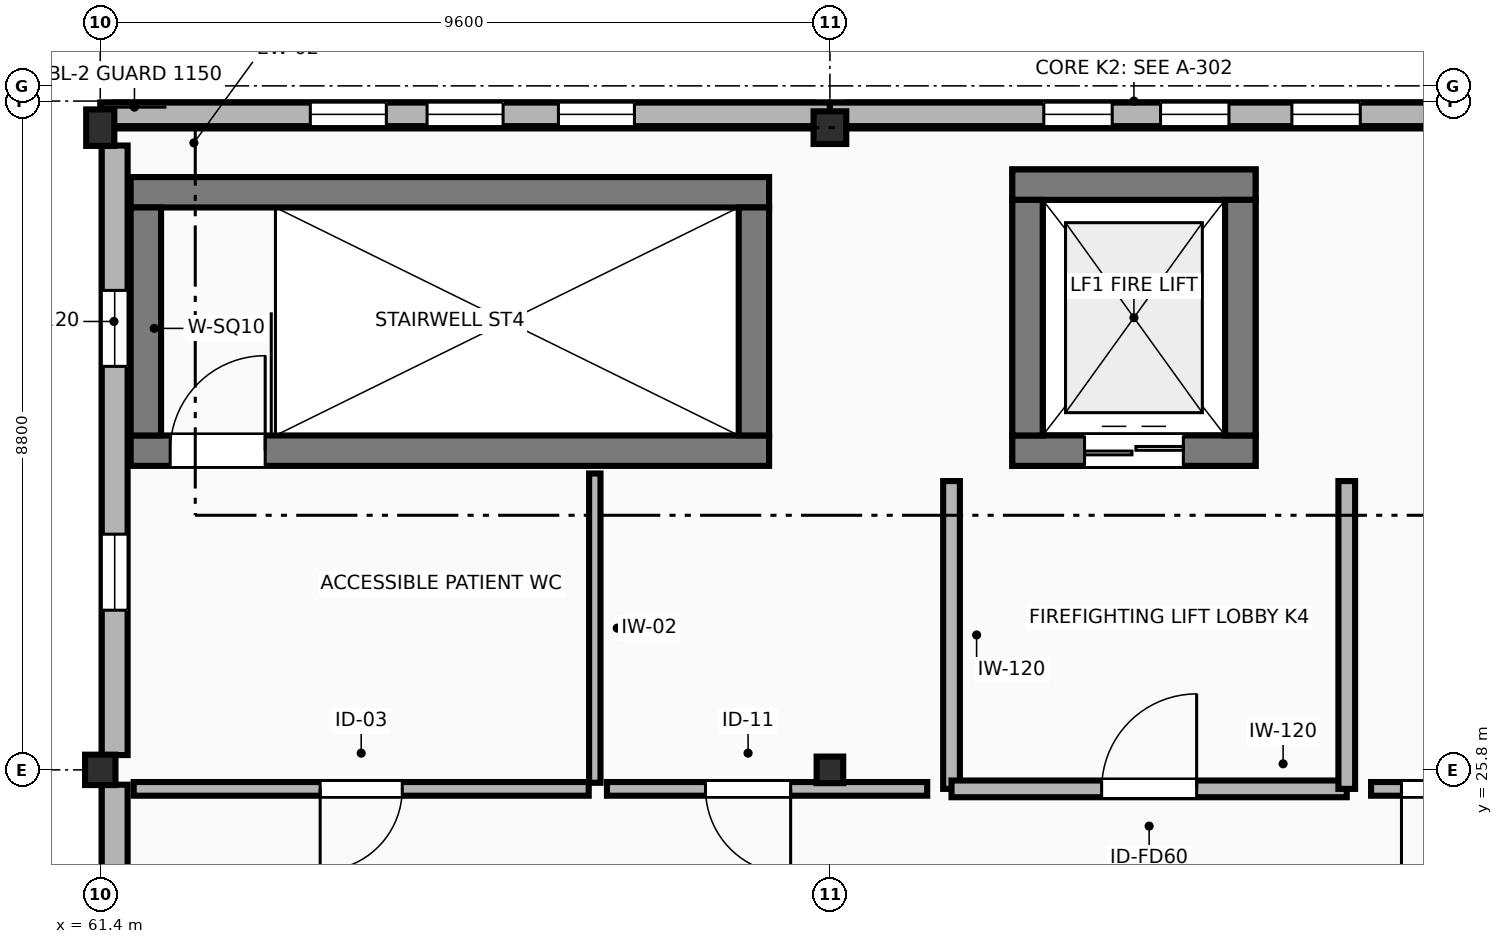
"""IFC4 building model, lengths in metres.
Left out: names, types, materials, properties, quantities, classifications, styles, units other than length and angle.
Written with IfcOpenShell. Run it as: python <this file> out.ifc"""

import sys

from ifc_helpers import new_model, si_unit, direction, frame, frame_2d, origin, origin_2d, place, context, subcontext, project, spatial, polyline, rectangle, outline, extrude, element, fill, save


model = new_model("IFC4")
c1 = context("Model", 3, precision=1e-05, world=origin(), true_north=direction((0.0, 1.0)))
c2 = subcontext(c1, "Body", "Model", "MODEL_VIEW")
j1 = project(units=[si_unit("LENGTHUNIT", "METRE"), si_unit("PLANEANGLEUNIT", "RADIAN")], contexts=[c1])
p1 = place(None, origin())
s1 = spatial("IfcSite", under=j1, at=p1, CompositionType="ELEMENT")
p2 = place(p1, origin())
s2 = spatial("IfcBuilding", under=s1, at=p2, CompositionType="ELEMENT")
p3 = place(p2, frame((0.0, 0.0, 22.2)))
s3 = spatial("IfcBuildingStorey", under=s2, at=p3, CompositionType="ELEMENT", Elevation=22.2)
p4 = place(p3, frame((61.4, 25.8, 0.0), z_axis=(0.0, 0.0, 1.0), x_axis=(1.0, 0.0, 0.0)))
e1 = element("IfcColumn", 1, at=p4, inside=s3, PredefinedType="COLUMN", context=c2, shape_type="SweptSolid", body=[
    extrude(rectangle(XDim=0.4, YDim=0.4, at=origin_2d()), origin(), (0.0, 0.0, 1.0), 4.2),
])
p5 = place(p3, frame((61.4, 34.25, 0.0), z_axis=(0.0, 0.0, 1.0), x_axis=(1.0, 0.0, 0.0)))
e2 = element("IfcColumn", 2, at=p5, inside=s3, PredefinedType="COLUMN", context=c2, shape_type="SweptSolid", body=[
    extrude(rectangle(XDim=0.37, YDim=0.48, at=origin_2d()), origin(), (0.0, 0.0, 1.0), 4.2),
])
p6 = place(p3, frame((71.0, 25.8, 0.0), z_axis=(0.0, 0.0, 1.0), x_axis=(1.0, 0.0, 0.0)))
e3 = element("IfcColumn", 3, at=p6, inside=s3, PredefinedType="COLUMN", context=c2, shape_type="SweptSolid", body=[
    extrude(rectangle(XDim=0.35, YDim=0.35, at=origin_2d()), origin(), (0.0, 0.0, 1.0), 4.2),
])
p7 = place(p3, frame((71.0, 34.25, 0.0), z_axis=(0.0, 0.0, 1.0), x_axis=(1.0, 0.0, 0.0)))
e4 = element("IfcColumn", 4, at=p7, inside=s3, PredefinedType="COLUMN", context=c2, shape_type="SweptSolid", body=[
    extrude(rectangle(XDim=0.43, YDim=0.43, at=origin_2d()), origin(), (0.0, 0.0, 1.0), 4.2),
])
p8 = place(p3, frame((80.415, 34.41, 0.0), z_axis=(0.0, 0.0, 1.0), x_axis=(-1.0, 0.0, 0.0)))
e5 = element("IfcWall", 5, at=p8, inside=s3, PredefinedType="STANDARD", context=c2, shape_type="SweptSolid", body=[
    extrude(rectangle(XDim=9.205, YDim=0.34, at=frame_2d((4.603, 0.0))), origin(), (0.0, 0.0, 1.0), 3.92),
])
p9 = place(p3, frame((70.79, 34.41, 0.0), z_axis=(0.0, 0.0, 1.0), x_axis=(-1.0, 0.0, 0.0)))
e6 = element("IfcWall", 6, at=p9, inside=s3, PredefinedType="STANDARD", context=c2, shape_type="SweptSolid", body=[
    extrude(rectangle(XDim=9.21, YDim=0.34, at=frame_2d((4.605, 0.0))), origin(), (0.0, 0.0, 1.0), 3.92),
])
p10 = place(p3, frame((61.59, 34.015, 0.0), z_axis=(0.0, 0.0, 1.0), x_axis=(0.0, -1.0, 0.0)))
e7 = element("IfcWall", 7, at=p10, inside=s3, PredefinedType="STANDARD", context=c2, shape_type="SweptSolid", body=[
    extrude(rectangle(XDim=8.02, YDim=0.34, at=frame_2d((4.01, 0.0))), origin(), (0.0, 0.0, 1.0), 3.035),
])
p11 = place(p10, frame((1.906, 0.0, 0.95)))
e8 = element("IfcOpeningElement", 8, at=p11, cuts=e7, PredefinedType="OPENING", context=c2, shape_type="SweptSolid", body=[
    extrude(rectangle(XDim=1.0, YDim=1.0, at=frame_2d((0.5, 0.5))), frame((0.0, 0.18, 0.0), z_axis=(0.0, -1.0, 0.0), x_axis=(1.0, 0.0, 0.0)), (0.0, 0.0, 1.0), 0.36),
])
p12 = place(p10, frame((5.114, 0.0, 0.95)))
e9 = element("IfcOpeningElement", 9, at=p12, cuts=e7, PredefinedType="OPENING", context=c2, shape_type="SweptSolid", body=[
    extrude(rectangle(XDim=1.0, YDim=1.0, at=frame_2d((0.5, 0.5))), frame((0.0, 0.18, 0.0), z_axis=(0.0, -1.0, 0.0), x_axis=(1.0, 0.0, 0.0)), (0.0, 0.0, 1.0), 0.36),
])
p13 = place(p3, frame((61.59, 25.605, 0.0), z_axis=(0.0, 0.0, 1.0), x_axis=(0.0, -1.0, 0.0)))
e10 = element("IfcWall", 10, at=p13, inside=s3, PredefinedType="STANDARD", context=c2, shape_type="SweptSolid", body=[
    extrude(rectangle(XDim=8.22, YDim=0.34, at=frame_2d((4.11, 0.0))), origin(), (0.0, 0.0, 1.0), 3.035),
])
p14 = place(p13, frame((1.866, 0.0, 0.95)))
e11 = element("IfcOpeningElement", 11, at=p14, cuts=e10, PredefinedType="OPENING", context=c2, shape_type="SweptSolid", body=[
    extrude(rectangle(XDim=1.2, YDim=1.2, at=frame_2d((0.6, 0.6))), frame((0.0, 0.18, 0.0), z_axis=(0.0, -1.0, 0.0), x_axis=(1.0, 0.0, 0.0)), (0.0, 0.0, 1.0), 0.36),
])
p15 = place(p13, frame((5.154, 0.0, 0.95)))
e12 = element("IfcOpeningElement", 12, at=p15, cuts=e10, PredefinedType="OPENING", context=c2, shape_type="SweptSolid", body=[
    extrude(rectangle(XDim=1.2, YDim=1.2, at=frame_2d((0.6, 0.6))), frame((0.0, 0.18, 0.0), z_axis=(0.0, -1.0, 0.0), x_axis=(1.0, 0.0, 0.0)), (0.0, 0.0, 1.0), 0.36),
])
p16 = place(p3, frame((71.0, 34.425, 4.2), z_axis=(0.0, 0.0, 1.0), x_axis=(-1.0, 0.0, 0.0)))
e13 = element("IfcWall", 13, at=p16, inside=s3, PredefinedType="STANDARD", context=c2, shape_type="SweptSolid", body=[
    extrude(outline(polyline([(0.0, 0.0), (9.6, 0.0), (9.6, 0.0), (4.8, 7.39), (0.0, 0.0), (0.0, 0.0)])), frame((0.0, 0.155, 0.0), z_axis=(0.0, -1.0, 0.0), x_axis=(1.0, 0.0, 0.0)), (0.0, 0.0, 1.0), 0.31),
])
p17 = place(p16, frame((2.572, 0.0, 0.75)))
e14 = element("IfcOpeningElement", 14, at=p17, cuts=e13, PredefinedType="OPENING", context=c2, shape_type="SweptSolid", body=[
    extrude(rectangle(XDim=1.0, YDim=1.0, at=frame_2d((0.5, 0.5))), frame((0.0, 0.165, 0.0), z_axis=(0.0, -1.0, 0.0), x_axis=(1.0, 0.0, 0.0)), (0.0, 0.0, 1.0), 0.33),
])
p18 = place(p16, frame((5.836, 0.0, 1.55)))
e15 = element("IfcOpeningElement", 15, at=p18, cuts=e13, PredefinedType="OPENING", context=c2, shape_type="SweptSolid", body=[
    extrude(rectangle(XDim=1.0, YDim=1.0, at=frame_2d((0.5, 0.5))), frame((0.0, 0.165, 0.0), z_axis=(0.0, -1.0, 0.0), x_axis=(1.0, 0.0, 0.0)), (0.0, 0.0, 1.0), 0.33),
])
p19 = place(p16, frame((4.3, 0.0, 3.35)))
e16 = element("IfcOpeningElement", 16, at=p19, cuts=e13, PredefinedType="OPENING", context=c2, shape_type="SweptSolid", body=[
    extrude(rectangle(XDim=1.0, YDim=1.0, at=frame_2d((0.5, 0.5))), frame((0.0, 0.165, 0.0), z_axis=(0.0, -1.0, 0.0), x_axis=(1.0, 0.0, 0.0)), (0.0, 0.0, 1.0), 0.33),
])
p20 = place(p3, frame((80.6, 34.425, 4.2), z_axis=(0.0, 0.0, 1.0), x_axis=(-1.0, 0.0, 0.0)))
e17 = element("IfcWall", 17, at=p20, inside=s3, PredefinedType="STANDARD", context=c2, shape_type="SweptSolid", body=[
    extrude(outline(polyline([(0.0, 0.0), (9.6, 0.0), (9.6, 0.0), (4.8, 9.09), (0.0, 0.0), (0.0, 0.0)])), frame((0.0, 0.155, 0.0), z_axis=(0.0, -1.0, 0.0), x_axis=(1.0, 0.0, 0.0)), (0.0, 0.0, 1.0), 0.31),
])
p21 = place(p20, frame((2.622, 0.0, 0.75)))
e18 = element("IfcOpeningElement", 18, at=p21, cuts=e17, PredefinedType="OPENING", context=c2, shape_type="SweptSolid", body=[
    extrude(rectangle(XDim=0.9, YDim=0.9, at=frame_2d((0.45, 0.45))), frame((0.0, 0.165, 0.0), z_axis=(0.0, -1.0, 0.0), x_axis=(1.0, 0.0, 0.0)), (0.0, 0.0, 1.0), 0.33),
])
p22 = place(p20, frame((5.886, 0.0, 1.55)))
e19 = element("IfcOpeningElement", 19, at=p22, cuts=e17, PredefinedType="OPENING", context=c2, shape_type="SweptSolid", body=[
    extrude(rectangle(XDim=0.9, YDim=0.9, at=frame_2d((0.45, 0.45))), frame((0.0, 0.165, 0.0), z_axis=(0.0, -1.0, 0.0), x_axis=(1.0, 0.0, 0.0)), (0.0, 0.0, 1.0), 0.33),
])
p23 = place(p20, frame((4.35, 0.0, 3.35)))
e20 = element("IfcOpeningElement", 20, at=p23, cuts=e17, PredefinedType="OPENING", context=c2, shape_type="SweptSolid", body=[
    extrude(rectangle(XDim=0.9, YDim=0.9, at=frame_2d((0.45, 0.45))), frame((0.0, 0.165, 0.0), z_axis=(0.0, -1.0, 0.0), x_axis=(1.0, 0.0, 0.0)), (0.0, 0.0, 1.0), 0.33),
])
p24 = place(p3, frame((61.8, 30.0, 0.0), z_axis=(0.0, 0.0, 1.0), x_axis=(1.0, 0.0, 0.0)))
e21 = element("IfcWall", 21, at=p24, inside=s3, PredefinedType="SHEAR", context=c2, shape_type="SweptSolid", body=[
    extrude(rectangle(XDim=8.4, YDim=0.4, at=frame_2d((4.2, 0.0))), origin(), (0.0, 0.0, 1.0), 3.92),
])
p25 = place(p24, frame((0.52, 0.0, 0.0)))
e22 = element("IfcOpeningElement", 22, at=p25, cuts=e21, PredefinedType="OPENING", context=c2, shape_type="SweptSolid", body=[
    extrude(rectangle(XDim=1.25, YDim=2.2, at=frame_2d((0.625, 1.1))), frame((0.0, 0.21, 0.0), z_axis=(0.0, -1.0, 0.0), x_axis=(1.0, 0.0, 0.0)), (0.0, 0.0, 1.0), 0.42),
])
p26 = place(p3, frame((70.2, 33.4, 0.0), z_axis=(0.0, 0.0, 1.0), x_axis=(-1.0, 0.0, 0.0)))
e23 = element("IfcWall", 23, at=p26, inside=s3, PredefinedType="SHEAR", context=c2, shape_type="SweptSolid", body=[
    extrude(rectangle(XDim=8.4, YDim=0.4, at=frame_2d((4.2, 0.0))), origin(), (0.0, 0.0, 1.0), 3.92),
])
for number, where, z_axis, x_axis in (
    (24, (62.0, 30.2, 0.0), (0.0, 0.0, 1.0), (0.0, 1.0, 0.0)),
    (25, (70.0, 33.2, 0.0), (0.0, 0.0, 1.0), (0.0, -1.0, 0.0)),
):
    element("IfcWall", number, at=place(p3, frame(where, z_axis=z_axis, x_axis=x_axis)), inside=s3, PredefinedType="SHEAR", context=c2, shape_type="SweptSolid", body=[
        extrude(rectangle(XDim=3.0, YDim=0.4, at=frame_2d((1.5, 0.0))), origin(), (0.0, 0.0, 1.0), 3.92),
    ])
p27 = place(p3, frame((73.4, 30.0, 0.0), z_axis=(0.0, 0.0, 1.0), x_axis=(1.0, 0.0, 0.0)))
e26 = element("IfcWall", 26, at=p27, inside=s3, PredefinedType="SHEAR", context=c2, shape_type="SweptSolid", body=[
    extrude(rectangle(XDim=3.2, YDim=0.4, at=frame_2d((1.6, 0.0))), origin(), (0.0, 0.0, 1.0), 4.2),
])
p28 = place(p27, frame((0.95, 0.0, 0.0)))
e27 = element("IfcOpeningElement", 27, at=p28, cuts=e26, PredefinedType="OPENING", context=c2, shape_type="SweptSolid", body=[
    extrude(rectangle(XDim=1.3, YDim=2.25, at=frame_2d((0.65, 1.125))), frame((0.0, 0.21, 0.0), z_axis=(0.0, -1.0, 0.0), x_axis=(1.0, 0.0, 0.0)), (0.0, 0.0, 1.0), 0.42),
])
p29 = place(p3, frame((76.6, 33.5, 0.0), z_axis=(0.0, 0.0, 1.0), x_axis=(-1.0, 0.0, 0.0)))
e28 = element("IfcWall", 28, at=p29, inside=s3, PredefinedType="SHEAR", context=c2, shape_type="SweptSolid", body=[
    extrude(rectangle(XDim=3.2, YDim=0.4, at=frame_2d((1.6, 0.0))), origin(), (0.0, 0.0, 1.0), 4.2),
])
for number, where, z_axis, x_axis in (
    (29, (73.6, 30.2, 0.0), (0.0, 0.0, 1.0), (0.0, 1.0, 0.0)),
    (30, (76.4, 33.3, 0.0), (0.0, 0.0, 1.0), (0.0, -1.0, 0.0)),
):
    element("IfcWall", number, at=place(p3, frame(where, z_axis=z_axis, x_axis=x_axis)), inside=s3, PredefinedType="SHEAR", context=c2, shape_type="SweptSolid", body=[
        extrude(rectangle(XDim=3.1, YDim=0.4, at=frame_2d((1.55, 0.0))), origin(), (0.0, 0.0, 1.0), 4.2),
    ])
for number, where, z_axis, x_axis in (
    (31, (73.4, 30.0, 4.2), (0.0, 0.0, 1.0), (1.0, 0.0, 0.0)),
    (32, (76.6, 33.5, 4.2), (0.0, 0.0, 1.0), (-1.0, 0.0, 0.0)),
):
    element("IfcWall", number, at=place(p3, frame(where, z_axis=z_axis, x_axis=x_axis)), inside=s3, PredefinedType="SHEAR", context=c2, shape_type="SweptSolid", body=[
        extrude(rectangle(XDim=3.2, YDim=0.4, at=frame_2d((1.6, 0.0))), origin(), (0.0, 0.0, 1.0), 3.15),
    ])
for number, where, z_axis, x_axis in (
    (33, (73.6, 30.2, 4.2), (0.0, 0.0, 1.0), (0.0, 1.0, 0.0)),
    (34, (76.4, 33.3, 4.2), (0.0, 0.0, 1.0), (0.0, -1.0, 0.0)),
):
    element("IfcWall", number, at=place(p3, frame(where, z_axis=z_axis, x_axis=x_axis)), inside=s3, PredefinedType="SHEAR", context=c2, shape_type="SweptSolid", body=[
        extrude(rectangle(XDim=3.1, YDim=0.4, at=frame_2d((1.55, 0.0))), origin(), (0.0, 0.0, 1.0), 3.15),
    ])
p30 = place(p3, frame((72.6, 29.6, 0.0), z_axis=(0.0, 0.0, 1.0), x_axis=(0.0, -1.0, 0.0)))
e35 = element("IfcWall", 35, at=p30, inside=s3, PredefinedType="PARTITIONING", context=c2, shape_type="SweptSolid", body=[
    extrude(rectangle(XDim=4.05, YDim=0.22, at=frame_2d((2.025, 0.0))), origin(), (0.0, 0.0, 1.0), 3.92),
])
p31 = place(p3, frame((72.6, 25.55, 0.0), z_axis=(0.0, 0.0, 1.0), x_axis=(1.0, 0.0, 0.0)))
e36 = element("IfcWall", 36, at=p31, inside=s3, PredefinedType="PARTITIONING", context=c2, shape_type="SweptSolid", body=[
    extrude(rectangle(XDim=5.2, YDim=0.22, at=frame_2d((2.6, 0.0))), origin(), (0.0, 0.0, 1.0), 3.92),
])
p32 = place(p31, frame((1.975, 0.0, 0.0)))
e37 = element("IfcOpeningElement", 37, at=p32, cuts=e36, PredefinedType="OPENING", context=c2, shape_type="SweptSolid", body=[
    extrude(rectangle(XDim=1.25, YDim=2.2, at=frame_2d((0.625, 1.1))), frame((0.0, 0.12, 0.0), z_axis=(0.0, -1.0, 0.0), x_axis=(1.0, 0.0, 0.0)), (0.0, 0.0, 1.0), 0.24),
])
p33 = place(p3, frame((77.8, 25.55, 0.0), z_axis=(0.0, 0.0, 1.0), x_axis=(0.0, 1.0, 0.0)))
e38 = element("IfcWall", 38, at=p33, inside=s3, PredefinedType="PARTITIONING", context=c2, shape_type="SweptSolid", body=[
    extrude(rectangle(XDim=4.05, YDim=0.22, at=frame_2d((2.025, 0.0))), origin(), (0.0, 0.0, 1.0), 3.92),
])
p34 = place(p3, frame((67.907, 29.7, 0.0), z_axis=(0.0, 0.0, 1.0), x_axis=(0.0, -1.0, 0.0)))
e39 = element("IfcWall", 39, at=p34, inside=s3, PredefinedType="PARTITIONING", context=c2, shape_type="SweptSolid", body=[
    extrude(rectangle(XDim=4.07, YDim=0.15, at=frame_2d((2.035, 0.0))), origin(), (0.0, 0.0, 1.0), 3.92),
])
p35 = place(p3, frame((67.827, 25.55, 0.0), z_axis=(0.0, 0.0, 1.0), x_axis=(-1.0, 0.0, 0.0)))
e40 = element("IfcWall", 40, at=p35, inside=s3, PredefinedType="PARTITIONING", context=c2, shape_type="SweptSolid", body=[
    extrude(rectangle(XDim=5.987, YDim=0.18, at=frame_2d((2.993, 0.0))), origin(), (0.0, 0.0, 1.0), 3.92),
])
p36 = place(p35, frame((2.453, 0.0, 0.0)))
e41 = element("IfcOpeningElement", 41, at=p36, cuts=e40, PredefinedType="OPENING", context=c2, shape_type="SweptSolid", body=[
    extrude(rectangle(XDim=1.08, YDim=2.2, at=frame_2d((0.54, 1.1))), frame((0.0, 0.1, 0.0), z_axis=(0.0, -1.0, 0.0), x_axis=(1.0, 0.0, 0.0)), (0.0, 0.0, 1.0), 0.2),
])
p37 = place(p3, frame((72.28, 25.55, 0.0), z_axis=(0.0, 0.0, 1.0), x_axis=(-1.0, 0.0, 0.0)))
e42 = element("IfcWall", 42, at=p37, inside=s3, PredefinedType="PARTITIONING", context=c2, shape_type="SweptSolid", body=[
    extrude(rectangle(XDim=4.213, YDim=0.18, at=frame_2d((2.107, 0.0))), origin(), (0.0, 0.0, 1.0), 3.92),
])
p38 = place(p37, frame((1.797, 0.0, 0.0)))
e43 = element("IfcOpeningElement", 43, at=p38, cuts=e42, PredefinedType="OPENING", context=c2, shape_type="SweptSolid", body=[
    extrude(rectangle(XDim=1.12, YDim=2.16, at=frame_2d((0.56, 1.08))), frame((0.0, 0.1, 0.0), z_axis=(0.0, -1.0, 0.0), x_axis=(1.0, 0.0, 0.0)), (0.0, 0.0, 1.0), 0.2),
])
p39 = place(p3, frame((80.24, 25.55, 0.0), z_axis=(0.0, 0.0, 1.0), x_axis=(-1.0, 0.0, 0.0)))
e44 = element("IfcWall", 44, at=p39, inside=s3, PredefinedType="PARTITIONING", context=c2, shape_type="SweptSolid", body=[
    extrude(rectangle(XDim=2.12, YDim=0.18, at=frame_2d((1.06, 0.0))), origin(), (0.0, 0.0, 1.0), 3.92),
])
p40 = place(p39, frame((0.4, 0.0, 0.0)))
e45 = element("IfcOpeningElement", 45, at=p40, cuts=e44, PredefinedType="OPENING", context=c2, shape_type="SweptSolid", body=[
    extrude(rectangle(XDim=1.32, YDim=2.22, at=frame_2d((0.66, 1.11))), frame((0.0, 0.1, 0.0), z_axis=(0.0, -1.0, 0.0), x_axis=(1.0, 0.0, 0.0)), (0.0, 0.0, 1.0), 0.2),
])
p41 = place(p11, origin())
e46 = element("IfcWindow", 46, at=p41, inside=s3, PartitioningType="SINGLE_PANEL", PredefinedType="WINDOW", context=c2, shape_type="SweptSolid", body=[
    extrude(rectangle(XDim=1.0, YDim=1.0, at=frame_2d((0.5, 0.5))), frame((0.0, 0.03, 0.0), z_axis=(0.0, -1.0, 0.0), x_axis=(1.0, 0.0, 0.0)), (0.0, 0.0, 1.0), 0.06),
])
fill(e8, e46)
p42 = place(p12, origin())
e47 = element("IfcWindow", 47, at=p42, inside=s3, PartitioningType="SINGLE_PANEL", PredefinedType="WINDOW", context=c2, shape_type="SweptSolid", body=[
    extrude(rectangle(XDim=1.0, YDim=1.0, at=frame_2d((0.5, 0.5))), frame((0.0, 0.03, 0.0), z_axis=(0.0, -1.0, 0.0), x_axis=(1.0, 0.0, 0.0)), (0.0, 0.0, 1.0), 0.06),
])
fill(e9, e47)
p43 = place(p17, origin())
e48 = element("IfcWindow", 48, at=p43, inside=s3, PartitioningType="SINGLE_PANEL", PredefinedType="WINDOW", context=c2, shape_type="SweptSolid", body=[
    extrude(rectangle(XDim=1.0, YDim=1.0, at=frame_2d((0.5, 0.5))), frame((0.0, 0.03, 0.0), z_axis=(0.0, -1.0, 0.0), x_axis=(1.0, 0.0, 0.0)), (0.0, 0.0, 1.0), 0.06),
])
fill(e14, e48)
p44 = place(p18, origin())
e49 = element("IfcWindow", 49, at=p44, inside=s3, PartitioningType="SINGLE_PANEL", PredefinedType="WINDOW", context=c2, shape_type="SweptSolid", body=[
    extrude(rectangle(XDim=1.0, YDim=1.0, at=frame_2d((0.5, 0.5))), frame((0.0, 0.03, 0.0), z_axis=(0.0, -1.0, 0.0), x_axis=(1.0, 0.0, 0.0)), (0.0, 0.0, 1.0), 0.06),
])
fill(e15, e49)
p45 = place(p19, origin())
e50 = element("IfcWindow", 50, at=p45, inside=s3, PartitioningType="SINGLE_PANEL", PredefinedType="WINDOW", context=c2, shape_type="SweptSolid", body=[
    extrude(rectangle(XDim=1.0, YDim=1.0, at=frame_2d((0.5, 0.5))), frame((0.0, 0.03, 0.0), z_axis=(0.0, -1.0, 0.0), x_axis=(1.0, 0.0, 0.0)), (0.0, 0.0, 1.0), 0.06),
])
fill(e16, e50)
p46 = place(p21, origin())
e51 = element("IfcWindow", 51, at=p46, inside=s3, PartitioningType="SINGLE_PANEL", PredefinedType="WINDOW", context=c2, shape_type="SweptSolid", body=[
    extrude(rectangle(XDim=0.9, YDim=0.9, at=frame_2d((0.45, 0.45))), frame((0.0, 0.03, 0.0), z_axis=(0.0, -1.0, 0.0), x_axis=(1.0, 0.0, 0.0)), (0.0, 0.0, 1.0), 0.06),
])
fill(e18, e51)
p47 = place(p22, origin())
e52 = element("IfcWindow", 52, at=p47, inside=s3, PartitioningType="SINGLE_PANEL", PredefinedType="WINDOW", context=c2, shape_type="SweptSolid", body=[
    extrude(rectangle(XDim=0.9, YDim=0.9, at=frame_2d((0.45, 0.45))), frame((0.0, 0.03, 0.0), z_axis=(0.0, -1.0, 0.0), x_axis=(1.0, 0.0, 0.0)), (0.0, 0.0, 1.0), 0.06),
])
fill(e19, e52)
p48 = place(p23, origin())
e53 = element("IfcWindow", 53, at=p48, inside=s3, PartitioningType="SINGLE_PANEL", PredefinedType="WINDOW", context=c2, shape_type="SweptSolid", body=[
    extrude(rectangle(XDim=0.9, YDim=0.9, at=frame_2d((0.45, 0.45))), frame((0.0, 0.03, 0.0), z_axis=(0.0, -1.0, 0.0), x_axis=(1.0, 0.0, 0.0)), (0.0, 0.0, 1.0), 0.06),
])
fill(e20, e53)
p49 = place(p25, origin())
e54 = element("IfcDoor", 54, at=p49, inside=s3, OperationType="SINGLE_SWING_RIGHT", PredefinedType="DOOR", context=c2, shape_type="SweptSolid", body=[
    extrude(rectangle(XDim=1.25, YDim=2.2, at=frame_2d((0.625, 1.1))), frame((0.0, 0.025, 0.0), z_axis=(0.0, -1.0, 0.0), x_axis=(1.0, 0.0, 0.0)), (0.0, 0.0, 1.0), 0.05),
])
fill(e22, e54)
p50 = place(p28, origin())
e55 = element("IfcDoor", 55, at=p50, inside=s3, OperationType="DOUBLE_DOOR_SLIDING", PredefinedType="DOOR", context=c2, shape_type="SweptSolid", body=[
    extrude(rectangle(XDim=1.3, YDim=2.25, at=frame_2d((0.65, 1.125))), frame((0.0, 0.025, 0.0), z_axis=(0.0, -1.0, 0.0), x_axis=(1.0, 0.0, 0.0)), (0.0, 0.0, 1.0), 0.05),
])
fill(e27, e55)
p51 = place(p32, origin())
e56 = element("IfcDoor", 56, at=p51, inside=s3, OperationType="SINGLE_SWING_RIGHT", PredefinedType="DOOR", context=c2, shape_type="SweptSolid", body=[
    extrude(rectangle(XDim=1.25, YDim=2.2, at=frame_2d((0.625, 1.1))), frame((0.0, 0.025, 0.0), z_axis=(0.0, -1.0, 0.0), x_axis=(1.0, 0.0, 0.0)), (0.0, 0.0, 1.0), 0.05),
])
fill(e37, e56)
p52 = place(p36, origin())
e57 = element("IfcDoor", 57, at=p52, inside=s3, OperationType="SINGLE_SWING_RIGHT", PredefinedType="DOOR", context=c2, shape_type="SweptSolid", body=[
    extrude(rectangle(XDim=1.08, YDim=2.2, at=frame_2d((0.54, 1.1))), frame((0.0, 0.025, 0.0), z_axis=(0.0, -1.0, 0.0), x_axis=(1.0, 0.0, 0.0)), (0.0, 0.0, 1.0), 0.05),
])
fill(e41, e57)
p53 = place(p38, origin())
e58 = element("IfcDoor", 58, at=p53, inside=s3, OperationType="SINGLE_SWING_LEFT", PredefinedType="DOOR", context=c2, shape_type="SweptSolid", body=[
    extrude(rectangle(XDim=1.12, YDim=2.16, at=frame_2d((0.56, 1.08))), frame((0.0, 0.025, 0.0), z_axis=(0.0, -1.0, 0.0), x_axis=(1.0, 0.0, 0.0)), (0.0, 0.0, 1.0), 0.05),
])
fill(e43, e58)
p54 = place(p40, origin())
e59 = element("IfcDoor", 59, at=p54, inside=s3, OperationType="SINGLE_SWING_RIGHT", PredefinedType="DOOR", context=c2, shape_type="SweptSolid", body=[
    extrude(rectangle(XDim=1.32, YDim=2.22, at=frame_2d((0.66, 1.11))), frame((0.0, 0.025, 0.0), z_axis=(0.0, -1.0, 0.0), x_axis=(1.0, 0.0, 0.0)), (0.0, 0.0, 1.0), 0.05),
])
fill(e45, e59)
save(model, sys.argv[1])
